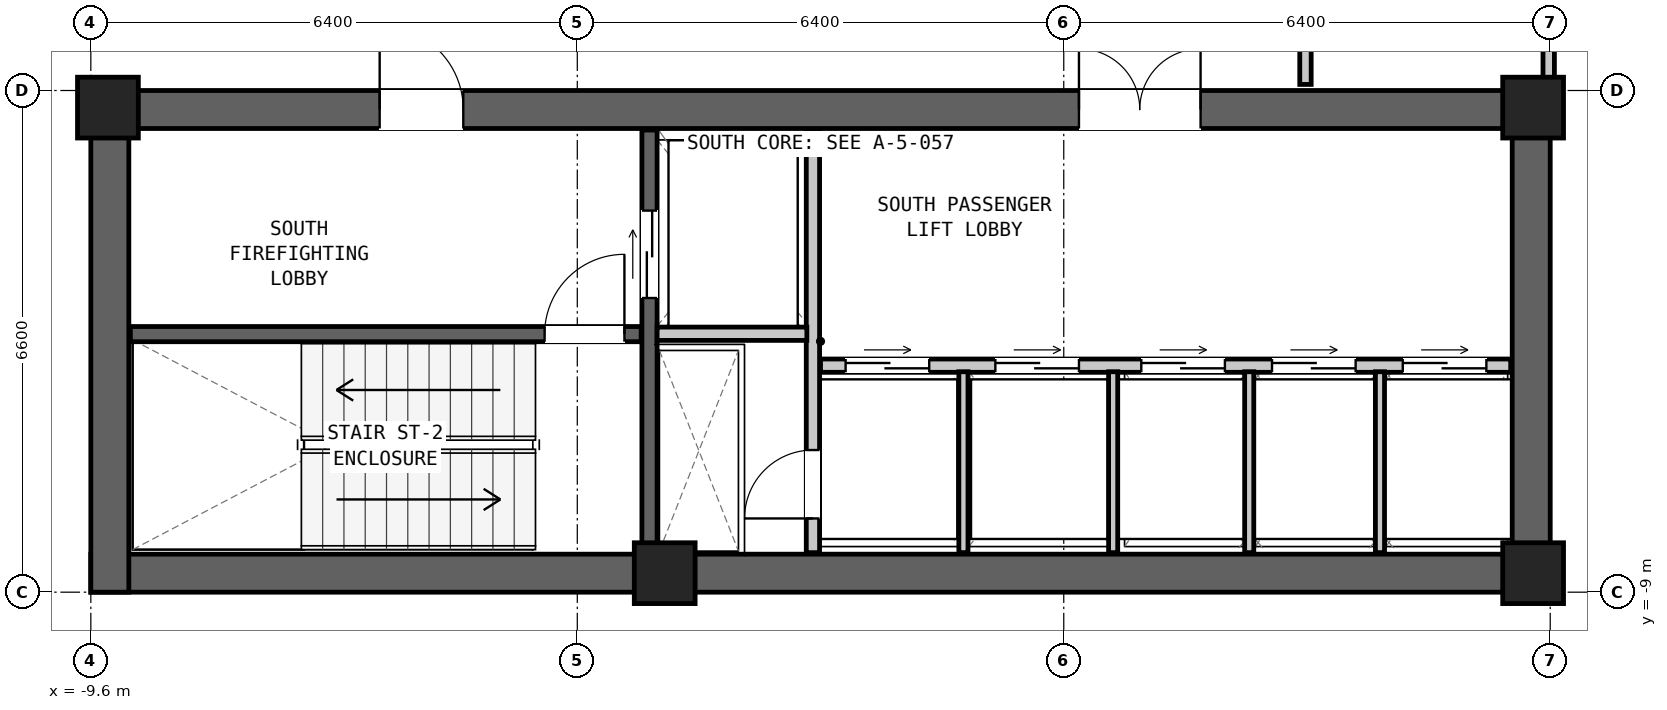
"""IFC4 building model, lengths in metres.
Left out: names, types, materials, properties, quantities, classifications, styles, units other than length and angle.
Written with IfcOpenShell. Run it as: python <this file> out.ifc"""

import sys

from ifc_helpers import new_model, si_unit, direction, frame, frame_2d, origin, origin_2d, place, context, subcontext, project, spatial, rectangle, extrude, element, fill, save


model = new_model("IFC4")
c1 = context("Model", 3, precision=1e-05, world=origin(), true_north=direction((0.0, 1.0)))
c2 = subcontext(c1, "Body", "Model", "MODEL_VIEW")
j1 = project(units=[si_unit("LENGTHUNIT", "METRE"), si_unit("PLANEANGLEUNIT", "RADIAN")], contexts=[c1])
p1 = place(None, origin())
s1 = spatial("IfcSite", under=j1, at=p1, CompositionType="ELEMENT")
p2 = place(p1, origin())
s2 = spatial("IfcBuilding", under=s1, at=p2, CompositionType="ELEMENT")
p3 = place(p2, frame((0.0, 0.0, 183.6)))
s3 = spatial("IfcBuildingStorey", under=s2, at=p3, CompositionType="ELEMENT", Elevation=183.6)
p4 = place(p3, frame((-9.6, -8.75, 0.0), z_axis=(0.0, 0.0, 1.0), x_axis=(1.0, 0.0, 0.0)))
e1 = element("IfcWall", 1, at=p4, inside=s3, PredefinedType="SHEAR", context=c2, shape_type="SweptSolid", body=[
    extrude(rectangle(XDim=19.2, YDim=0.5, at=frame_2d((9.6, 0.0))), origin(), (0.0, 0.0, 1.0), 4.35),
])
p5 = place(p3, frame((-9.6, -2.65, 0.0), z_axis=(0.0, 0.0, 1.0), x_axis=(1.0, 0.0, 0.0)))
e2 = element("IfcWall", 2, at=p5, inside=s3, PredefinedType="SHEAR", context=c2, shape_type="SweptSolid", body=[
    extrude(rectangle(XDim=19.2, YDim=0.5, at=frame_2d((9.6, 0.0))), origin(), (0.0, 0.0, 1.0), 4.35),
])
p6 = place(p5, frame((3.8, 0.0, 0.0)))
e3 = element("IfcOpeningElement", 3, at=p6, cuts=e2, PredefinedType="OPENING", context=c2, shape_type="SweptSolid", body=[
    extrude(rectangle(XDim=1.1, YDim=2.08, at=frame_2d((0.55, 1.04))), frame((0.0, 0.262, 0.0), z_axis=(0.0, -1.0, 0.0), x_axis=(1.0, 0.0, 0.0)), (0.0, 0.0, 1.0), 0.524),
])
p7 = place(p5, frame((13.0, 0.0, 0.0)))
e4 = element("IfcOpeningElement", 4, at=p7, cuts=e2, PredefinedType="OPENING", context=c2, shape_type="SweptSolid", body=[
    extrude(rectangle(XDim=1.6, YDim=2.12, at=frame_2d((0.8, 1.06))), frame((0.0, 0.262, 0.0), z_axis=(0.0, -1.0, 0.0), x_axis=(1.0, 0.0, 0.0)), (0.0, 0.0, 1.0), 0.524),
])
for number, where, z_axis, x_axis in (
    (5, (-9.35, -9.0, 0.0), (0.0, 0.0, 1.0), (0.0, 1.0, 0.0)),
    (6, (9.35, -9.0, 0.0), (0.0, 0.0, 1.0), (0.0, 1.0, 0.0)),
):
    element("IfcWall", number, at=place(p3, frame(where, z_axis=z_axis, x_axis=x_axis)), inside=s3, PredefinedType="SHEAR", context=c2, shape_type="SweptSolid", body=[
        extrude(rectangle(XDim=6.6, YDim=0.5, at=frame_2d((3.3, 0.0))), origin(), (0.0, 0.0, 1.0), 4.35),
    ])
for number, where, z_axis, x_axis in (
    (7, (-9.375, -2.625, 0.0), (0.0, 0.0, 1.0), (1.0, 0.0, 0.0)),
    (8, (9.375, -2.625, 0.0), (0.0, 0.0, 1.0), (1.0, 0.0, 0.0)),
    (9, (-2.05, -8.75, 0.0), (0.0, 0.0, 1.0), (1.0, 0.0, 0.0)),
    (10, (9.375, -8.75, 0.0), (0.0, 0.0, 1.0), (1.0, 0.0, 0.0)),
):
    element("IfcColumn", number, at=place(p3, frame(where, z_axis=z_axis, x_axis=x_axis)), inside=s3, PredefinedType="COLUMN", context=c2, shape_type="SweptSolid", body=[
        extrude(rectangle(XDim=0.8, YDim=0.8, at=origin_2d()), origin(), (0.0, 0.0, 1.0), 4.35),
    ])
p8 = place(p3, frame((-9.08, -5.605, 0.0), z_axis=(0.0, 0.0, 1.0), x_axis=(1.0, 0.0, 0.0)))
e11 = element("IfcWall", 11, at=p8, inside=s3, PredefinedType="SHEAR", context=c2, shape_type="SweptSolid", body=[
    extrude(rectangle(XDim=6.72, YDim=0.2, at=frame_2d((3.36, 0.0))), origin(), (0.0, 0.0, 1.0), 4.07),
])
p9 = place(p8, frame((5.45, 0.0, 0.0)))
e12 = element("IfcOpeningElement", 12, at=p9, cuts=e11, PredefinedType="OPENING", context=c2, shape_type="SweptSolid", body=[
    extrude(rectangle(XDim=1.05, YDim=2.08, at=frame_2d((0.525, 1.04))), frame((0.0, 0.112, 0.0), z_axis=(0.0, -1.0, 0.0), x_axis=(1.0, 0.0, 0.0)), (0.0, 0.0, 1.0), 0.224),
])
p10 = place(p3, frame((-2.25, -8.48, 0.0), z_axis=(0.0, 0.0, 1.0), x_axis=(0.0, 1.0, 0.0)))
e13 = element("IfcWall", 13, at=p10, inside=s3, PredefinedType="SHEAR", context=c2, shape_type="SweptSolid", body=[
    extrude(rectangle(XDim=5.56, YDim=0.2, at=frame_2d((2.78, 0.0))), origin(), (0.0, 0.0, 1.0), 4.07),
])
p11 = place(p10, frame((3.35, 0.0, 0.0)))
e14 = element("IfcOpeningElement", 14, at=p11, cuts=e13, PredefinedType="OPENING", context=c2, shape_type="SweptSolid", body=[
    extrude(rectangle(XDim=1.15, YDim=2.08, at=frame_2d((0.575, 1.04))), frame((0.0, 0.112, 0.0), z_axis=(0.0, -1.0, 0.0), x_axis=(1.0, 0.0, 0.0)), (0.0, 0.0, 1.0), 0.224),
])
p12 = place(p3, frame((-0.1, -8.48, 0.0), z_axis=(0.0, 0.0, 1.0), x_axis=(0.0, 1.0, 0.0)))
e15 = element("IfcWall", 15, at=p12, inside=s3, PredefinedType="PARTITIONING", context=c2, shape_type="SweptSolid", body=[
    extrude(rectangle(XDim=5.56, YDim=0.175, at=frame_2d((2.78, 0.0))), origin(), (0.0, 0.0, 1.0), 4.07),
])
p13 = place(p12, frame((0.45, 0.0, 0.0)))
e16 = element("IfcOpeningElement", 16, at=p13, cuts=e15, PredefinedType="OPENING", context=c2, shape_type="SweptSolid", body=[
    extrude(rectangle(XDim=0.9, YDim=2.05, at=frame_2d((0.45, 1.025))), frame((0.0, 0.1, 0.0), z_axis=(0.0, -1.0, 0.0), x_axis=(1.0, 0.0, 0.0)), (0.0, 0.0, 1.0), 0.199),
])
p14 = place(p3, frame((-2.15, -5.6, 0.0), z_axis=(0.0, 0.0, 1.0), x_axis=(1.0, 0.0, 0.0)))
e17 = element("IfcWall", 17, at=p14, inside=s3, PredefinedType="PARTITIONING", context=c2, shape_type="SweptSolid", body=[
    extrude(rectangle(XDim=1.97, YDim=0.175, at=frame_2d((0.985, 0.0))), origin(), (0.0, 0.0, 1.0), 4.07),
])
p15 = place(p3, frame((0.0, -6.02, 0.0), z_axis=(0.0, 0.0, 1.0), x_axis=(1.0, 0.0, 0.0)))
e18 = element("IfcWall", 18, at=p15, inside=s3, PredefinedType="PARTITIONING", context=c2, shape_type="SweptSolid", body=[
    extrude(rectangle(XDim=9.08, YDim=0.175, at=frame_2d((4.54, 0.0))), origin(), (0.0, 0.0, 1.0), 4.07),
])
p16 = place(p15, frame((0.33, 0.0, 0.0)))
e19 = element("IfcOpeningElement", 19, at=p16, cuts=e18, PredefinedType="OPENING", context=c2, shape_type="SweptSolid", body=[
    extrude(rectangle(XDim=1.1, YDim=2.06, at=frame_2d((0.55, 1.03))), frame((0.0, 0.1, 0.0), z_axis=(0.0, -1.0, 0.0), x_axis=(1.0, 0.0, 0.0)), (0.0, 0.0, 1.0), 0.199),
])
p17 = place(p15, frame((2.3, 0.0, 0.0)))
e20 = element("IfcOpeningElement", 20, at=p17, cuts=e18, PredefinedType="OPENING", context=c2, shape_type="SweptSolid", body=[
    extrude(rectangle(XDim=1.1, YDim=2.06, at=frame_2d((0.55, 1.03))), frame((0.0, 0.1, 0.0), z_axis=(0.0, -1.0, 0.0), x_axis=(1.0, 0.0, 0.0)), (0.0, 0.0, 1.0), 0.199),
])
p18 = place(p15, frame((4.22, 0.0, 0.0)))
e21 = element("IfcOpeningElement", 21, at=p18, cuts=e18, PredefinedType="OPENING", context=c2, shape_type="SweptSolid", body=[
    extrude(rectangle(XDim=1.1, YDim=2.06, at=frame_2d((0.55, 1.03))), frame((0.0, 0.1, 0.0), z_axis=(0.0, -1.0, 0.0), x_axis=(1.0, 0.0, 0.0)), (0.0, 0.0, 1.0), 0.199),
])
p19 = place(p15, frame((5.94, 0.0, 0.0)))
e22 = element("IfcOpeningElement", 22, at=p19, cuts=e18, PredefinedType="OPENING", context=c2, shape_type="SweptSolid", body=[
    extrude(rectangle(XDim=1.1, YDim=2.06, at=frame_2d((0.55, 1.03))), frame((0.0, 0.1, 0.0), z_axis=(0.0, -1.0, 0.0), x_axis=(1.0, 0.0, 0.0)), (0.0, 0.0, 1.0), 0.199),
])
p20 = place(p15, frame((7.66, 0.0, 0.0)))
e23 = element("IfcOpeningElement", 23, at=p20, cuts=e18, PredefinedType="OPENING", context=c2, shape_type="SweptSolid", body=[
    extrude(rectangle(XDim=1.1, YDim=2.06, at=frame_2d((0.55, 1.03))), frame((0.0, 0.1, 0.0), z_axis=(0.0, -1.0, 0.0), x_axis=(1.0, 0.0, 0.0)), (0.0, 0.0, 1.0), 0.199),
])
for number, where, z_axis, x_axis in (
    (24, (1.88, -8.48, 0.0), (0.0, 0.0, 1.0), (0.0, 1.0, 0.0)),
    (25, (3.85, -8.48, 0.0), (0.0, 0.0, 1.0), (0.0, 1.0, 0.0)),
    (26, (5.64, -8.48, 0.0), (0.0, 0.0, 1.0), (0.0, 1.0, 0.0)),
    (27, (7.36, -8.48, 0.0), (0.0, 0.0, 1.0), (0.0, 1.0, 0.0)),
):
    element("IfcWall", number, at=place(p3, frame(where, z_axis=z_axis, x_axis=x_axis)), inside=s3, PredefinedType="PARTITIONING", context=c2, shape_type="SweptSolid", body=[
        extrude(rectangle(XDim=2.38, YDim=0.12, at=frame_2d((1.19, 0.0))), origin(), (0.0, 0.0, 1.0), 4.07),
    ])
p21 = place(p3, frame((6.38, -2.32, 0.0), z_axis=(0.0, 0.0, 1.0), x_axis=(0.0, 1.0, 0.0)))
e28 = element("IfcWall", 28, at=p21, inside=s3, PredefinedType="PARTITIONING", context=c2, shape_type="SweptSolid", body=[
    extrude(rectangle(XDim=5.84, YDim=0.15, at=frame_2d((2.92, 0.0))), origin(), (0.0, 0.0, 1.0), 3.438),
])
p22 = place(p3, frame((9.58, -2.32, 0.0), z_axis=(0.0, 0.0, 1.0), x_axis=(0.0, 1.0, 0.0)))
e29 = element("IfcWall", 29, at=p22, inside=s3, PredefinedType="PARTITIONING", context=c2, shape_type="SweptSolid", body=[
    extrude(rectangle(XDim=5.84, YDim=0.15, at=frame_2d((2.92, 0.0))), origin(), (0.0, 0.0, 1.0), 2.25),
])
p23 = place(p22, frame((2.445, 0.0, 0.0)))
e30 = element("IfcOpeningElement", 30, at=p23, cuts=e29, PredefinedType="OPENING", context=c2, shape_type="SweptSolid", body=[
    extrude(rectangle(XDim=0.95, YDim=2.1, at=frame_2d((0.475, 1.05))), frame((0.0, 0.087, 0.0), z_axis=(0.0, -1.0, 0.0), x_axis=(1.0, 0.0, 0.0)), (0.0, 0.0, 1.0), 0.174),
])
p24 = place(p9, origin())
e31 = element("IfcDoor", 31, at=p24, inside=s3, OperationType="SINGLE_SWING_RIGHT", PredefinedType="DOOR", context=c2, shape_type="SweptSolid", body=[
    extrude(rectangle(XDim=1.05, YDim=2.08, at=frame_2d((0.525, 1.04))), frame((0.0, 0.025, 0.0), z_axis=(0.0, -1.0, 0.0), x_axis=(1.0, 0.0, 0.0)), (0.0, 0.0, 1.0), 0.05),
])
fill(e12, e31)
p25 = place(p6, origin())
e32 = element("IfcDoor", 32, at=p25, inside=s3, OperationType="SINGLE_SWING_LEFT", PredefinedType="DOOR", context=c2, shape_type="SweptSolid", body=[
    extrude(rectangle(XDim=1.1, YDim=2.08, at=frame_2d((0.55, 1.04))), frame((0.0, 0.025, 0.0), z_axis=(0.0, -1.0, 0.0), x_axis=(1.0, 0.0, 0.0)), (0.0, 0.0, 1.0), 0.05),
])
fill(e3, e32)
p26 = place(p11, origin())
e33 = element("IfcDoor", 33, at=p26, inside=s3, OperationType="DOUBLE_DOOR_SLIDING", PredefinedType="DOOR", context=c2, shape_type="SweptSolid", body=[
    extrude(rectangle(XDim=1.15, YDim=2.08, at=frame_2d((0.575, 1.04))), frame((0.0, 0.025, 0.0), z_axis=(0.0, -1.0, 0.0), x_axis=(1.0, 0.0, 0.0)), (0.0, 0.0, 1.0), 0.05),
])
fill(e14, e33)
p27 = place(p13, origin())
e34 = element("IfcDoor", 34, at=p27, inside=s3, OperationType="SINGLE_SWING_LEFT", PredefinedType="DOOR", context=c2, shape_type="SweptSolid", body=[
    extrude(rectangle(XDim=0.9, YDim=2.05, at=frame_2d((0.45, 1.025))), frame((0.0, 0.025, 0.0), z_axis=(0.0, -1.0, 0.0), x_axis=(1.0, 0.0, 0.0)), (0.0, 0.0, 1.0), 0.05),
])
fill(e16, e34)
p28 = place(p16, origin())
e35 = element("IfcDoor", 35, at=p28, inside=s3, OperationType="DOUBLE_DOOR_SLIDING", PredefinedType="DOOR", context=c2, shape_type="SweptSolid", body=[
    extrude(rectangle(XDim=1.1, YDim=2.06, at=frame_2d((0.55, 1.03))), frame((0.0, 0.025, 0.0), z_axis=(0.0, -1.0, 0.0), x_axis=(1.0, 0.0, 0.0)), (0.0, 0.0, 1.0), 0.05),
])
fill(e19, e35)
p29 = place(p17, origin())
e36 = element("IfcDoor", 36, at=p29, inside=s3, OperationType="DOUBLE_DOOR_SLIDING", PredefinedType="DOOR", context=c2, shape_type="SweptSolid", body=[
    extrude(rectangle(XDim=1.1, YDim=2.06, at=frame_2d((0.55, 1.03))), frame((0.0, 0.025, 0.0), z_axis=(0.0, -1.0, 0.0), x_axis=(1.0, 0.0, 0.0)), (0.0, 0.0, 1.0), 0.05),
])
fill(e20, e36)
p30 = place(p18, origin())
e37 = element("IfcDoor", 37, at=p30, inside=s3, OperationType="DOUBLE_DOOR_SLIDING", PredefinedType="DOOR", context=c2, shape_type="SweptSolid", body=[
    extrude(rectangle(XDim=1.1, YDim=2.06, at=frame_2d((0.55, 1.03))), frame((0.0, 0.025, 0.0), z_axis=(0.0, -1.0, 0.0), x_axis=(1.0, 0.0, 0.0)), (0.0, 0.0, 1.0), 0.05),
])
fill(e21, e37)
p31 = place(p19, origin())
e38 = element("IfcDoor", 38, at=p31, inside=s3, OperationType="DOUBLE_DOOR_SLIDING", PredefinedType="DOOR", context=c2, shape_type="SweptSolid", body=[
    extrude(rectangle(XDim=1.1, YDim=2.06, at=frame_2d((0.55, 1.03))), frame((0.0, 0.025, 0.0), z_axis=(0.0, -1.0, 0.0), x_axis=(1.0, 0.0, 0.0)), (0.0, 0.0, 1.0), 0.05),
])
fill(e22, e38)
p32 = place(p20, origin())
e39 = element("IfcDoor", 39, at=p32, inside=s3, OperationType="DOUBLE_DOOR_SLIDING", PredefinedType="DOOR", context=c2, shape_type="SweptSolid", body=[
    extrude(rectangle(XDim=1.1, YDim=2.06, at=frame_2d((0.55, 1.03))), frame((0.0, 0.025, 0.0), z_axis=(0.0, -1.0, 0.0), x_axis=(1.0, 0.0, 0.0)), (0.0, 0.0, 1.0), 0.05),
])
fill(e23, e39)
p33 = place(p7, origin())
e40 = element("IfcDoor", 40, at=p33, inside=s3, OperationType="DOUBLE_DOOR_SINGLE_SWING", PredefinedType="DOOR", context=c2, shape_type="SweptSolid", body=[
    extrude(rectangle(XDim=1.6, YDim=2.12, at=frame_2d((0.8, 1.06))), frame((0.0, 0.025, 0.0), z_axis=(0.0, -1.0, 0.0), x_axis=(1.0, 0.0, 0.0)), (0.0, 0.0, 1.0), 0.05),
])
fill(e4, e40)
save(model, sys.argv[1])
